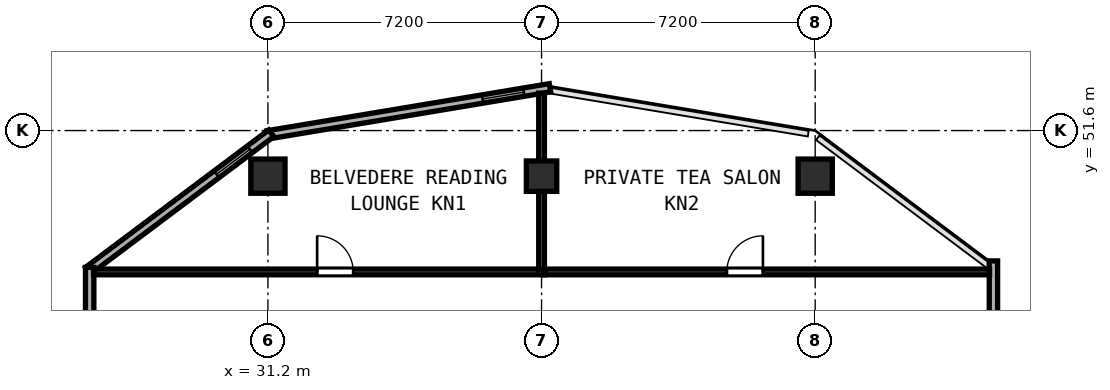
"""IFC4 building model, lengths in metres.
Left out: names, types, materials, properties, quantities, classifications, styles, units other than length and angle.
Written with IfcOpenShell. Run it as: python <this file> out.ifc"""

import sys

from ifc_helpers import new_model, si_unit, direction, frame, frame_2d, origin, origin_2d, place, context, subcontext, project, spatial, rectangle, hollow_rectangle, extrude, element, fill, save


model = new_model("IFC4")
c1 = context("Model", 3, precision=1e-05, world=origin(), true_north=direction((0.0, 1.0)))
c2 = subcontext(c1, "Body", "Model", "MODEL_VIEW")
j1 = project(units=[si_unit("LENGTHUNIT", "METRE"), si_unit("PLANEANGLEUNIT", "RADIAN")], contexts=[c1])
p1 = place(None, origin())
s1 = spatial("IfcSite", under=j1, at=p1, CompositionType="ELEMENT")
p2 = place(p1, origin())
s2 = spatial("IfcBuilding", under=s1, at=p2, CompositionType="ELEMENT")
p3 = place(p2, frame((0.0, 0.0, 184.2)))
s3 = spatial("IfcBuildingStorey", under=s2, at=p3, CompositionType="ELEMENT", Elevation=184.2)
for number, where, z_axis, x_axis in (
    (1, (31.2, 50.4, 0.0), (0.0, 0.0, 1.0), (1.0, 0.0, 0.0)),
    (2, (45.6, 50.4, 0.0), (0.0, 0.0, 1.0), (1.0, 0.0, 0.0)),
):
    element("IfcColumn", number, at=place(p3, frame(where, z_axis=z_axis, x_axis=x_axis)), inside=s3, PredefinedType="COLUMN", context=c2, shape_type="SweptSolid", body=[
        extrude(hollow_rectangle(XDim=0.9, YDim=0.9, WallThickness=0.034, at=origin_2d()), origin(), (0.0, 0.0, 1.0), 3.8),
    ])
p4 = place(p3, frame((38.4, 50.4, 0.0), z_axis=(0.0, 0.0, 1.0), x_axis=(1.0, 0.0, 0.0)))
e3 = element("IfcColumn", 3, at=p4, inside=s3, PredefinedType="COLUMN", context=c2, shape_type="SweptSolid", body=[
    extrude(hollow_rectangle(XDim=0.8, YDim=0.8, WallThickness=0.03, at=origin_2d()), origin(), (0.0, 0.0, 1.0), 3.8),
])
p5 = place(p3, frame((50.29, 46.635, 0.0), z_axis=(0.0, 0.0, 1.0), x_axis=(0.0, 1.0, 0.0)))
e4 = element("IfcWall", 4, at=p5, inside=s3, PredefinedType="SOLIDWALL", context=c2, shape_type="SweptSolid", body=[
    extrude(rectangle(XDim=1.535, YDim=0.22, at=frame_2d((0.768, 0.0))), origin(), (0.0, 0.0, 1.0), 3.62),
])
p6 = place(p3, frame((38.622, 52.726, 0.0), z_axis=(0.0, 0.0, 1.0), x_axis=(-0.986390420428, -0.164420006349, 0.0)))
e5 = element("IfcWall", 5, at=p6, inside=s3, PredefinedType="SOLIDWALL", context=c2, shape_type="SweptSolid", body=[
    extrude(rectangle(XDim=7.534, YDim=0.22, at=frame_2d((3.767, 0.0))), origin(), (0.0, 0.0, 1.0), 3.62),
])
p7 = place(p6, frame((0.7, 0.0, 0.85)))
e6 = element("IfcOpeningElement", 6, at=p7, cuts=e5, PredefinedType="OPENING", context=c2, shape_type="SweptSolid", body=[
    extrude(rectangle(XDim=1.1, YDim=1.75, at=frame_2d((0.55, 0.875))), frame((0.0, 0.12, 0.0), z_axis=(0.0, -1.0, 0.0), x_axis=(1.0, 0.0, 0.0)), (0.0, 0.0, 1.0), 0.24),
])
p8 = place(p3, frame((31.289, 51.529, 0.0), z_axis=(0.0, 0.0, 1.0), x_axis=(-0.800014580093, -0.599980559383, 0.0)))
e7 = element("IfcWall", 7, at=p8, inside=s3, PredefinedType="SOLIDWALL", context=c2, shape_type="SweptSolid", body=[
    extrude(rectangle(XDim=6.028, YDim=0.22, at=frame_2d((3.014, 0.0))), origin(), (0.0, 0.0, 1.0), 3.62),
])
p9 = place(p8, frame((0.7, 0.0, 0.85)))
e8 = element("IfcOpeningElement", 8, at=p9, cuts=e7, PredefinedType="OPENING", context=c2, shape_type="SweptSolid", body=[
    extrude(rectangle(XDim=1.1, YDim=1.75, at=frame_2d((0.55, 0.875))), frame((0.0, 0.12, 0.0), z_axis=(0.0, -1.0, 0.0), x_axis=(1.0, 0.0, 0.0)), (0.0, 0.0, 1.0), 0.24),
])
p10 = place(p3, frame((26.51, 48.0, 0.0), z_axis=(0.0, 0.0, 1.0), x_axis=(0.0, -1.0, 0.0)))
e9 = element("IfcWall", 9, at=p10, inside=s3, PredefinedType="SOLIDWALL", context=c2, shape_type="SweptSolid", body=[
    extrude(rectangle(XDim=1.365, YDim=0.22, at=frame_2d((0.683, 0.0))), origin(), (0.0, 0.0, 1.0), 3.62),
])
p11 = place(p3, frame((26.612, 47.88, 0.0), z_axis=(0.0, 0.0, 1.0), x_axis=(1.0, 0.0, 0.0)))
e10 = element("IfcWall", 10, at=p11, inside=s3, PredefinedType="PARTITIONING", context=c2, shape_type="SweptSolid", body=[
    extrude(rectangle(XDim=11.868, YDim=0.15, at=frame_2d((5.934, 0.0))), origin(), (0.0, 0.0, 1.0), 3.62),
])
p12 = place(p11, frame((5.883, 0.0, 0.0)))
e11 = element("IfcOpeningElement", 11, at=p12, cuts=e10, PredefinedType="OPENING", context=c2, shape_type="SweptSolid", body=[
    extrude(rectangle(XDim=0.95, YDim=2.12, at=frame_2d((0.475, 1.06))), frame((0.0, 0.085, 0.0), z_axis=(0.0, -1.0, 0.0), x_axis=(1.0, 0.0, 0.0)), (0.0, 0.0, 1.0), 0.17),
])
p13 = place(p3, frame((38.4, 47.94, 0.0), z_axis=(0.0, 0.0, 1.0), x_axis=(0.0, 1.0, 0.0)))
e12 = element("IfcWall", 12, at=p13, inside=s3, PredefinedType="PARTITIONING", context=c2, shape_type="SweptSolid", body=[
    extrude(rectangle(XDim=4.645, YDim=0.15, at=frame_2d((2.323, 0.0))), origin(), (0.0, 0.0, 1.0), 3.62),
])
p14 = place(p3, frame((38.482, 47.88, 0.0), z_axis=(0.0, 0.0, 1.0), x_axis=(1.0, 0.0, 0.0)))
e13 = element("IfcWall", 13, at=p14, inside=s3, PredefinedType="PARTITIONING", context=c2, shape_type="SweptSolid", body=[
    extrude(rectangle(XDim=11.706, YDim=0.15, at=frame_2d((5.853, 0.0))), origin(), (0.0, 0.0, 1.0), 3.62),
])
p15 = place(p14, frame((4.793, 0.0, 0.0)))
e14 = element("IfcOpeningElement", 14, at=p15, cuts=e13, PredefinedType="OPENING", context=c2, shape_type="SweptSolid", body=[
    extrude(rectangle(XDim=0.95, YDim=2.12, at=frame_2d((0.475, 1.06))), frame((0.0, 0.085, 0.0), z_axis=(0.0, -1.0, 0.0), x_axis=(1.0, 0.0, 0.0)), (0.0, 0.0, 1.0), 0.17),
])
p16 = place(p7, origin())
e15 = element("IfcWindow", 15, at=p16, inside=s3, PartitioningType="SINGLE_PANEL", PredefinedType="WINDOW", context=c2, shape_type="SweptSolid", body=[
    extrude(rectangle(XDim=1.1, YDim=1.75, at=frame_2d((0.55, 0.875))), frame((0.0, 0.03, 0.0), z_axis=(0.0, -1.0, 0.0), x_axis=(1.0, 0.0, 0.0)), (0.0, 0.0, 1.0), 0.06),
])
fill(e6, e15)
p17 = place(p9, origin())
e16 = element("IfcWindow", 16, at=p17, inside=s3, PartitioningType="SINGLE_PANEL", PredefinedType="WINDOW", context=c2, shape_type="SweptSolid", body=[
    extrude(rectangle(XDim=1.1, YDim=1.75, at=frame_2d((0.55, 0.875))), frame((0.0, 0.03, 0.0), z_axis=(0.0, -1.0, 0.0), x_axis=(1.0, 0.0, 0.0)), (0.0, 0.0, 1.0), 0.06),
])
fill(e8, e16)
p18 = place(p12, origin())
e17 = element("IfcDoor", 17, at=p18, inside=s3, OperationType="SINGLE_SWING_LEFT", PredefinedType="DOOR", context=c2, shape_type="SweptSolid", body=[
    extrude(rectangle(XDim=0.95, YDim=2.12, at=frame_2d((0.475, 1.06))), frame((0.0, 0.025, 0.0), z_axis=(0.0, -1.0, 0.0), x_axis=(1.0, 0.0, 0.0)), (0.0, 0.0, 1.0), 0.05),
])
fill(e11, e17)
p19 = place(p15, origin())
e18 = element("IfcDoor", 18, at=p19, inside=s3, OperationType="SINGLE_SWING_RIGHT", PredefinedType="DOOR", context=c2, shape_type="SweptSolid", body=[
    extrude(rectangle(XDim=0.95, YDim=2.12, at=frame_2d((0.475, 1.06))), frame((0.0, 0.025, 0.0), z_axis=(0.0, -1.0, 0.0), x_axis=(1.0, 0.0, 0.0)), (0.0, 0.0, 1.0), 0.05),
])
fill(e14, e18)
save(model, sys.argv[1])
